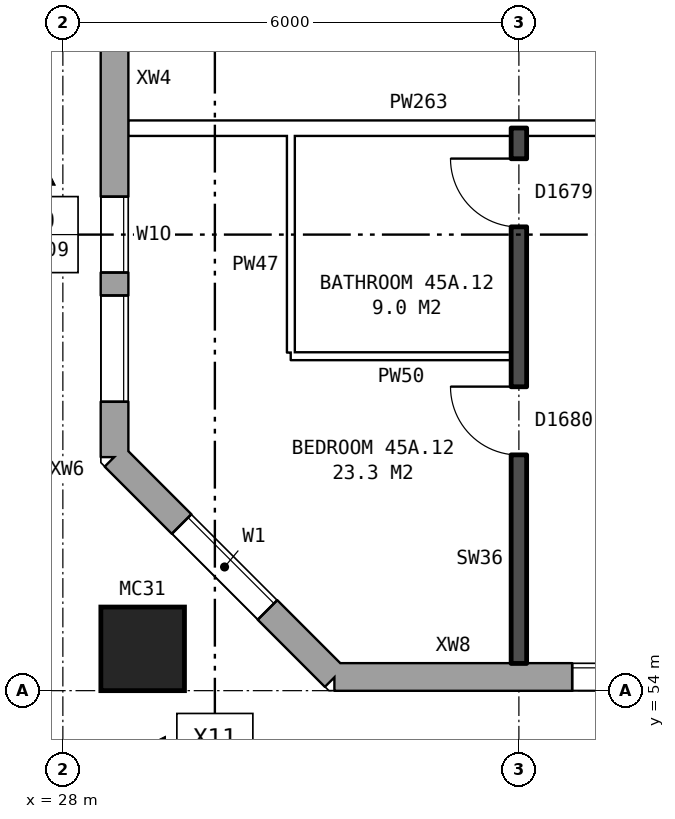
"""IFC4 building model, lengths in metres.
Left out: names, types, materials, properties, quantities, classifications, styles, units other than length and angle.
Written with IfcOpenShell. Run it as: python <this file> out.ifc"""

import sys

from ifc_helpers import new_model, si_unit, direction, frame, frame_2d, origin, origin_2d, place, context, subcontext, project, spatial, rectangle, hollow_rectangle, extrude, element, fill, save


model = new_model("IFC4")
c1 = context("Model", 3, precision=1e-05, world=origin(), true_north=direction((0.0, 1.0)))
c2 = subcontext(c1, "Body", "Model", "MODEL_VIEW")
j1 = project(units=[si_unit("LENGTHUNIT", "METRE"), si_unit("PLANEANGLEUNIT", "RADIAN")], contexts=[c1])
p1 = place(None, origin())
s1 = spatial("IfcSite", under=j1, at=p1, CompositionType="ELEMENT")
p2 = place(p1, origin())
s2 = spatial("IfcBuilding", under=s1, at=p2, CompositionType="ELEMENT")
p3 = place(p2, frame((0.0, 0.0, 160.9)))
s3 = spatial("IfcBuildingStorey", under=s2, at=p3, CompositionType="ELEMENT", Elevation=160.9)
p4 = place(p3, frame((29.05, 54.55, 0.0), z_axis=(0.0, 0.0, 1.0), x_axis=(1.0, 0.0, 0.0)))
e1 = element("IfcColumn", 1, at=p4, inside=s3, PredefinedType="COLUMN", context=c2, shape_type="SweptSolid", body=[
    extrude(hollow_rectangle(XDim=1.1, YDim=1.1, WallThickness=0.06, at=origin_2d()), origin(), (0.0, 0.0, 1.0), 3.1),
])
p5 = place(p3, frame((28.68, 57.075, 0.0), z_axis=(0.0, 0.0, 1.0), x_axis=(0.707106781187, -0.707106781187, 0.0)))
e2 = element("IfcWall", 2, at=p5, inside=s3, PredefinedType="STANDARD", context=c2, shape_type="SweptSolid", body=[
    extrude(rectangle(XDim=4.094, YDim=0.36, at=frame_2d((2.047, 0.0))), origin(), (0.0, 0.0, 1.0), 2.85),
])
p6 = place(p5, frame((1.247, 0.0, 0.8)))
e3 = element("IfcOpeningElement", 3, at=p6, cuts=e2, PredefinedType="OPENING", context=c2, shape_type="SweptSolid", body=[
    extrude(rectangle(XDim=1.6, YDim=1.8, at=frame_2d((0.8, 0.9))), frame((0.0, 0.19, 0.0), z_axis=(0.0, -1.0, 0.0), x_axis=(1.0, 0.0, 0.0)), (0.0, 0.0, 1.0), 0.38),
])
p7 = place(p3, frame((31.575, 54.18, 0.0), z_axis=(0.0, 0.0, 1.0), x_axis=(1.0, 0.0, 0.0)))
e4 = element("IfcWall", 4, at=p7, inside=s3, PredefinedType="STANDARD", context=c2, shape_type="SweptSolid", body=[
    extrude(rectangle(XDim=41.351, YDim=0.36, at=frame_2d((20.675, 0.0))), origin(), (0.0, 0.0, 1.0), 2.85),
])
p8 = place(p7, frame((3.125, 0.0, 0.8)))
e5 = element("IfcOpeningElement", 5, at=p8, cuts=e4, PredefinedType="OPENING", context=c2, shape_type="SweptSolid", body=[
    extrude(rectangle(XDim=1.6, YDim=1.8, at=frame_2d((0.8, 0.9))), frame((0.0, 0.19, 0.0), z_axis=(0.0, -1.0, 0.0), x_axis=(1.0, 0.0, 0.0)), (0.0, 0.0, 1.0), 0.38),
])
p9 = place(p7, frame((6.125, 0.0, 0.8)))
e6 = element("IfcOpeningElement", 6, at=p9, cuts=e4, PredefinedType="OPENING", context=c2, shape_type="SweptSolid", body=[
    extrude(rectangle(XDim=1.6, YDim=1.8, at=frame_2d((0.8, 0.9))), frame((0.0, 0.19, 0.0), z_axis=(0.0, -1.0, 0.0), x_axis=(1.0, 0.0, 0.0)), (0.0, 0.0, 1.0), 0.38),
])
p10 = place(p7, frame((9.125, 0.0, 0.8)))
e7 = element("IfcOpeningElement", 7, at=p10, cuts=e4, PredefinedType="OPENING", context=c2, shape_type="SweptSolid", body=[
    extrude(rectangle(XDim=1.6, YDim=1.8, at=frame_2d((0.8, 0.9))), frame((0.0, 0.19, 0.0), z_axis=(0.0, -1.0, 0.0), x_axis=(1.0, 0.0, 0.0)), (0.0, 0.0, 1.0), 0.38),
])
p11 = place(p7, frame((12.125, 0.0, 0.8)))
e8 = element("IfcOpeningElement", 8, at=p11, cuts=e4, PredefinedType="OPENING", context=c2, shape_type="SweptSolid", body=[
    extrude(rectangle(XDim=1.6, YDim=1.8, at=frame_2d((0.8, 0.9))), frame((0.0, 0.19, 0.0), z_axis=(0.0, -1.0, 0.0), x_axis=(1.0, 0.0, 0.0)), (0.0, 0.0, 1.0), 0.38),
])
p12 = place(p7, frame((15.375, 0.0, 0.25)))
e9 = element("IfcOpeningElement", 9, at=p12, cuts=e4, PredefinedType="OPENING", context=c2, shape_type="SweptSolid", body=[
    extrude(rectangle(XDim=0.6, YDim=0.9, at=frame_2d((0.3, 0.45))), frame((0.0, 0.19, 0.0), z_axis=(0.0, -1.0, 0.0), x_axis=(1.0, 0.0, 0.0)), (0.0, 0.0, 1.0), 0.38),
])
p13 = place(p7, frame((18.125, 0.0, 0.8)))
e10 = element("IfcOpeningElement", 10, at=p13, cuts=e4, PredefinedType="OPENING", context=c2, shape_type="SweptSolid", body=[
    extrude(rectangle(XDim=1.6, YDim=1.8, at=frame_2d((0.8, 0.9))), frame((0.0, 0.19, 0.0), z_axis=(0.0, -1.0, 0.0), x_axis=(1.0, 0.0, 0.0)), (0.0, 0.0, 1.0), 0.38),
])
p14 = place(p7, frame((21.125, 0.0, 0.8)))
e11 = element("IfcOpeningElement", 11, at=p14, cuts=e4, PredefinedType="OPENING", context=c2, shape_type="SweptSolid", body=[
    extrude(rectangle(XDim=1.6, YDim=1.8, at=frame_2d((0.8, 0.9))), frame((0.0, 0.19, 0.0), z_axis=(0.0, -1.0, 0.0), x_axis=(1.0, 0.0, 0.0)), (0.0, 0.0, 1.0), 0.38),
])
p15 = place(p7, frame((23.575, 0.0, 0.25)))
e12 = element("IfcOpeningElement", 12, at=p15, cuts=e4, PredefinedType="OPENING", context=c2, shape_type="SweptSolid", body=[
    extrude(rectangle(XDim=1.2, YDim=1.8, at=frame_2d((0.6, 0.9))), frame((0.0, 0.19, 0.0), z_axis=(0.0, -1.0, 0.0), x_axis=(1.0, 0.0, 0.0)), (0.0, 0.0, 1.0), 0.38),
])
p16 = place(p7, frame((26.625, 0.0, 1.7)))
e13 = element("IfcOpeningElement", 13, at=p16, cuts=e4, PredefinedType="OPENING", context=c2, shape_type="SweptSolid", body=[
    extrude(rectangle(XDim=0.6, YDim=0.9, at=frame_2d((0.3, 0.45))), frame((0.0, 0.19, 0.0), z_axis=(0.0, -1.0, 0.0), x_axis=(1.0, 0.0, 0.0)), (0.0, 0.0, 1.0), 0.38),
])
p17 = place(p7, frame((30.125, 0.0, 0.8)))
e14 = element("IfcOpeningElement", 14, at=p17, cuts=e4, PredefinedType="OPENING", context=c2, shape_type="SweptSolid", body=[
    extrude(rectangle(XDim=1.6, YDim=1.8, at=frame_2d((0.8, 0.9))), frame((0.0, 0.19, 0.0), z_axis=(0.0, -1.0, 0.0), x_axis=(1.0, 0.0, 0.0)), (0.0, 0.0, 1.0), 0.38),
])
p18 = place(p7, frame((33.125, 0.0, 0.8)))
e15 = element("IfcOpeningElement", 15, at=p18, cuts=e4, PredefinedType="OPENING", context=c2, shape_type="SweptSolid", body=[
    extrude(rectangle(XDim=1.6, YDim=1.8, at=frame_2d((0.8, 0.9))), frame((0.0, 0.19, 0.0), z_axis=(0.0, -1.0, 0.0), x_axis=(1.0, 0.0, 0.0)), (0.0, 0.0, 1.0), 0.38),
])
p19 = place(p7, frame((36.125, 0.0, 0.8)))
e16 = element("IfcOpeningElement", 16, at=p19, cuts=e4, PredefinedType="OPENING", context=c2, shape_type="SweptSolid", body=[
    extrude(rectangle(XDim=1.6, YDim=1.8, at=frame_2d((0.8, 0.9))), frame((0.0, 0.19, 0.0), z_axis=(0.0, -1.0, 0.0), x_axis=(1.0, 0.0, 0.0)), (0.0, 0.0, 1.0), 0.38),
])
p20 = place(p7, frame((39.125, 0.0, 0.8)))
e17 = element("IfcOpeningElement", 17, at=p20, cuts=e4, PredefinedType="OPENING", context=c2, shape_type="SweptSolid", body=[
    extrude(rectangle(XDim=1.6, YDim=1.8, at=frame_2d((0.8, 0.9))), frame((0.0, 0.19, 0.0), z_axis=(0.0, -1.0, 0.0), x_axis=(1.0, 0.0, 0.0)), (0.0, 0.0, 1.0), 0.38),
])
p21 = place(p7, frame((16.275, 0.0, 0.35)))
e18 = element("IfcOpeningElement", 18, at=p21, cuts=e4, PredefinedType="OPENING", context=c2, shape_type="SweptSolid", body=[
    extrude(rectangle(XDim=1.0, YDim=1.5, at=frame_2d((0.5, 0.75))), frame((0.0, 0.19, 0.0), z_axis=(0.0, -1.0, 0.0), x_axis=(1.0, 0.0, 0.0)), (0.0, 0.0, 1.0), 0.38),
])
p22 = place(p7, frame((25.075, 0.0, 0.25)))
e19 = element("IfcOpeningElement", 19, at=p22, cuts=e4, PredefinedType="OPENING", context=c2, shape_type="SweptSolid", body=[
    extrude(rectangle(XDim=0.8, YDim=0.9, at=frame_2d((0.4, 0.45))), frame((0.0, 0.19, 0.0), z_axis=(0.0, -1.0, 0.0), x_axis=(1.0, 0.0, 0.0)), (0.0, 0.0, 1.0), 0.38),
])
p23 = place(p7, frame((27.675, 0.0, 0.8)))
e20 = element("IfcOpeningElement", 20, at=p23, cuts=e4, PredefinedType="OPENING", context=c2, shape_type="SweptSolid", body=[
    extrude(rectangle(XDim=1.6, YDim=1.8, at=frame_2d((0.8, 0.9))), frame((0.0, 0.19, 0.0), z_axis=(0.0, -1.0, 0.0), x_axis=(1.0, 0.0, 0.0)), (0.0, 0.0, 1.0), 0.38),
])
p24 = place(p3, frame((28.68, 82.925, 0.0), z_axis=(0.0, 0.0, 1.0), x_axis=(0.0, -1.0, 0.0)))
e21 = element("IfcWall", 21, at=p24, inside=s3, PredefinedType="STANDARD", context=c2, shape_type="SweptSolid", body=[
    extrude(rectangle(XDim=25.851, YDim=0.36, at=frame_2d((12.925, 0.0))), origin(), (0.0, 0.0, 1.0), 2.85),
])
p25 = place(p24, frame((0.3, 0.0, 0.8)))
e22 = element("IfcOpeningElement", 22, at=p25, cuts=e21, PredefinedType="OPENING", context=c2, shape_type="SweptSolid", body=[
    extrude(rectangle(XDim=1.4, YDim=1.8, at=frame_2d((0.7, 0.9))), frame((0.0, 0.19, 0.0), z_axis=(0.0, -1.0, 0.0), x_axis=(1.0, 0.0, 0.0)), (0.0, 0.0, 1.0), 0.38),
])
p26 = place(p24, frame((5.475, 0.0, 1.4)))
e23 = element("IfcOpeningElement", 23, at=p26, cuts=e21, PredefinedType="OPENING", context=c2, shape_type="SweptSolid", body=[
    extrude(rectangle(XDim=1.4, YDim=1.2, at=frame_2d((0.7, 0.6))), frame((0.0, 0.19, 0.0), z_axis=(0.0, -1.0, 0.0), x_axis=(1.0, 0.0, 0.0)), (0.0, 0.0, 1.0), 0.38),
])
p27 = place(p24, frame((7.625, 0.0, 0.8)))
e24 = element("IfcOpeningElement", 24, at=p27, cuts=e21, PredefinedType="OPENING", context=c2, shape_type="SweptSolid", body=[
    extrude(rectangle(XDim=1.6, YDim=1.8, at=frame_2d((0.8, 0.9))), frame((0.0, 0.19, 0.0), z_axis=(0.0, -1.0, 0.0), x_axis=(1.0, 0.0, 0.0)), (0.0, 0.0, 1.0), 0.38),
])
p28 = place(p24, frame((10.625, 0.0, 0.8)))
e25 = element("IfcOpeningElement", 25, at=p28, cuts=e21, PredefinedType="OPENING", context=c2, shape_type="SweptSolid", body=[
    extrude(rectangle(XDim=1.6, YDim=1.8, at=frame_2d((0.8, 0.9))), frame((0.0, 0.19, 0.0), z_axis=(0.0, -1.0, 0.0), x_axis=(1.0, 0.0, 0.0)), (0.0, 0.0, 1.0), 0.38),
])
p29 = place(p24, frame((13.625, 0.0, 0.8)))
e26 = element("IfcOpeningElement", 26, at=p29, cuts=e21, PredefinedType="OPENING", context=c2, shape_type="SweptSolid", body=[
    extrude(rectangle(XDim=1.6, YDim=1.8, at=frame_2d((0.8, 0.9))), frame((0.0, 0.19, 0.0), z_axis=(0.0, -1.0, 0.0), x_axis=(1.0, 0.0, 0.0)), (0.0, 0.0, 1.0), 0.38),
])
p30 = place(p24, frame((16.625, 0.0, 0.8)))
e27 = element("IfcOpeningElement", 27, at=p30, cuts=e21, PredefinedType="OPENING", context=c2, shape_type="SweptSolid", body=[
    extrude(rectangle(XDim=1.6, YDim=1.8, at=frame_2d((0.8, 0.9))), frame((0.0, 0.19, 0.0), z_axis=(0.0, -1.0, 0.0), x_axis=(1.0, 0.0, 0.0)), (0.0, 0.0, 1.0), 0.38),
])
p31 = place(p24, frame((9.525, 0.0, 0.8)))
e28 = element("IfcOpeningElement", 28, at=p31, cuts=e21, PredefinedType="OPENING", context=c2, shape_type="SweptSolid", body=[
    extrude(rectangle(XDim=0.8, YDim=1.8, at=frame_2d((0.4, 0.9))), frame((0.0, 0.19, 0.0), z_axis=(0.0, -1.0, 0.0), x_axis=(1.0, 0.0, 0.0)), (0.0, 0.0, 1.0), 0.38),
])
p32 = place(p24, frame((22.425, 0.0, 0.8)))
e29 = element("IfcOpeningElement", 29, at=p32, cuts=e21, PredefinedType="OPENING", context=c2, shape_type="SweptSolid", body=[
    extrude(rectangle(XDim=1.0, YDim=1.2, at=frame_2d((0.5, 0.6))), frame((0.0, 0.19, 0.0), z_axis=(0.0, -1.0, 0.0), x_axis=(1.0, 0.0, 0.0)), (0.0, 0.0, 1.0), 0.38),
])
p33 = place(p24, frame((2.0, 0.0, 0.8)))
e30 = element("IfcOpeningElement", 30, at=p33, cuts=e21, PredefinedType="OPENING", context=c2, shape_type="SweptSolid", body=[
    extrude(rectangle(XDim=0.8, YDim=1.5, at=frame_2d((0.4, 0.75))), frame((0.0, 0.19, 0.0), z_axis=(0.0, -1.0, 0.0), x_axis=(1.0, 0.0, 0.0)), (0.0, 0.0, 1.0), 0.38),
])
p34 = place(p24, frame((12.525, 0.0, 0.8)))
e31 = element("IfcOpeningElement", 31, at=p34, cuts=e21, PredefinedType="OPENING", context=c2, shape_type="SweptSolid", body=[
    extrude(rectangle(XDim=0.8, YDim=1.8, at=frame_2d((0.4, 0.9))), frame((0.0, 0.19, 0.0), z_axis=(0.0, -1.0, 0.0), x_axis=(1.0, 0.0, 0.0)), (0.0, 0.0, 1.0), 0.38),
])
p35 = place(p24, frame((15.525, 0.0, 0.8)))
e32 = element("IfcOpeningElement", 32, at=p35, cuts=e21, PredefinedType="OPENING", context=c2, shape_type="SweptSolid", body=[
    extrude(rectangle(XDim=0.8, YDim=1.8, at=frame_2d((0.4, 0.9))), frame((0.0, 0.19, 0.0), z_axis=(0.0, -1.0, 0.0), x_axis=(1.0, 0.0, 0.0)), (0.0, 0.0, 1.0), 0.38),
])
p36 = place(p24, frame((18.525, 0.0, 0.8)))
e33 = element("IfcOpeningElement", 33, at=p36, cuts=e21, PredefinedType="OPENING", context=c2, shape_type="SweptSolid", body=[
    extrude(rectangle(XDim=0.8, YDim=1.8, at=frame_2d((0.4, 0.9))), frame((0.0, 0.19, 0.0), z_axis=(0.0, -1.0, 0.0), x_axis=(1.0, 0.0, 0.0)), (0.0, 0.0, 1.0), 0.38),
])
p37 = place(p24, frame((23.725, 0.0, 0.8)))
e34 = element("IfcOpeningElement", 34, at=p37, cuts=e21, PredefinedType="OPENING", context=c2, shape_type="SweptSolid", body=[
    extrude(rectangle(XDim=1.4, YDim=1.8, at=frame_2d((0.7, 0.9))), frame((0.0, 0.19, 0.0), z_axis=(0.0, -1.0, 0.0), x_axis=(1.0, 0.0, 0.0)), (0.0, 0.0, 1.0), 0.38),
])
p38 = place(p3, frame((31.0, 58.4, 0.0), z_axis=(0.0, 0.0, 1.0), x_axis=(1.0, 0.0, 0.0)))
e35 = element("IfcWall", 35, at=p38, inside=s3, PredefinedType="PARTITIONING", context=c2, shape_type="SweptSolid", body=[
    extrude(rectangle(XDim=2.9, YDim=0.1, at=frame_2d((1.45, 0.0))), origin(), (0.0, 0.0, 1.0), 2.85),
])
p39 = place(p3, frame((28.86, 61.4, 0.0), z_axis=(0.0, 0.0, 1.0), x_axis=(1.0, 0.0, 0.0)))
e36 = element("IfcWall", 36, at=p39, inside=s3, PredefinedType="PARTITIONING", context=c2, shape_type="SweptSolid", body=[
    extrude(rectangle(XDim=17.04, YDim=0.2, at=frame_2d((8.52, 0.0))), origin(), (0.0, 0.0, 1.0), 2.85),
])
p40 = place(p39, frame((14.59, 0.0, 0.0)))
e37 = element("IfcOpeningElement", 37, at=p40, cuts=e36, PredefinedType="OPENING", context=c2, shape_type="SweptSolid", body=[
    extrude(rectangle(XDim=1.0, YDim=2.1, at=frame_2d((0.5, 1.05))), frame((0.0, 0.11, 0.0), z_axis=(0.0, -1.0, 0.0), x_axis=(1.0, 0.0, 0.0)), (0.0, 0.0, 1.0), 0.22),
])
p41 = place(p39, frame((7.64, 0.0, 0.0)))
e38 = element("IfcOpeningElement", 38, at=p41, cuts=e36, PredefinedType="OPENING", context=c2, shape_type="SweptSolid", body=[
    extrude(rectangle(XDim=1.0, YDim=2.1, at=frame_2d((0.5, 1.05))), frame((0.0, 0.11, 0.0), z_axis=(0.0, -1.0, 0.0), x_axis=(1.0, 0.0, 0.0)), (0.0, 0.0, 1.0), 0.22),
])
p42 = place(p3, frame((31.0, 58.45, 0.0), z_axis=(0.0, 0.0, 1.0), x_axis=(0.0, 1.0, 0.0)))
e39 = element("IfcWall", 39, at=p42, inside=s3, PredefinedType="PARTITIONING", context=c2, shape_type="SweptSolid", body=[
    extrude(rectangle(XDim=2.85, YDim=0.1, at=frame_2d((1.425, 0.0))), origin(), (0.0, 0.0, 1.0), 2.85),
])
p43 = place(p3, frame((34.0, 54.36, 0.0), z_axis=(0.0, 0.0, 1.0), x_axis=(0.0, 1.0, 0.0)))
e40 = element("IfcWall", 40, at=p43, inside=s3, PredefinedType="SOLIDWALL", context=c2, shape_type="SweptSolid", body=[
    extrude(rectangle(XDim=7.04, YDim=0.2, at=frame_2d((3.52, 0.0))), origin(), (0.0, 0.0, 1.0), 2.85),
])
p44 = place(p43, frame((2.74, 0.0, 0.0)))
e41 = element("IfcOpeningElement", 41, at=p44, cuts=e40, PredefinedType="OPENING", context=c2, shape_type="SweptSolid", body=[
    extrude(rectangle(XDim=0.9, YDim=2.1, at=frame_2d((0.45, 1.05))), frame((0.0, 0.11, 0.0), z_axis=(0.0, -1.0, 0.0), x_axis=(1.0, 0.0, 0.0)), (0.0, 0.0, 1.0), 0.22),
])
p45 = place(p43, frame((5.74, 0.0, 0.0)))
e42 = element("IfcOpeningElement", 42, at=p45, cuts=e40, PredefinedType="OPENING", context=c2, shape_type="SweptSolid", body=[
    extrude(rectangle(XDim=0.9, YDim=2.1, at=frame_2d((0.45, 1.05))), frame((0.0, 0.11, 0.0), z_axis=(0.0, -1.0, 0.0), x_axis=(1.0, 0.0, 0.0)), (0.0, 0.0, 1.0), 0.22),
])
p46 = place(p6, origin())
e43 = element("IfcWindow", 43, at=p46, inside=s3, PartitioningType="SINGLE_PANEL", PredefinedType="WINDOW", context=c2, shape_type="SweptSolid", body=[
    extrude(rectangle(XDim=1.6, YDim=1.8, at=frame_2d((0.8, 0.9))), frame((0.0, 0.15, 0.0), z_axis=(0.0, -1.0, 0.0), x_axis=(1.0, 0.0, 0.0)), (0.0, 0.0, 1.0), 0.06),
])
fill(e3, e43)
p47 = place(p8, origin())
e44 = element("IfcWindow", 44, at=p47, inside=s3, PartitioningType="SINGLE_PANEL", PredefinedType="WINDOW", context=c2, shape_type="SweptSolid", body=[
    extrude(rectangle(XDim=1.6, YDim=1.8, at=frame_2d((0.8, 0.9))), frame((0.0, 0.15, 0.0), z_axis=(0.0, -1.0, 0.0), x_axis=(1.0, 0.0, 0.0)), (0.0, 0.0, 1.0), 0.06),
])
fill(e5, e44)
p48 = place(p32, origin())
e45 = element("IfcWindow", 45, at=p48, inside=s3, PartitioningType="SINGLE_PANEL", PredefinedType="WINDOW", context=c2, shape_type="SweptSolid", body=[
    extrude(rectangle(XDim=1.0, YDim=1.2, at=frame_2d((0.5, 0.6))), frame((0.0, 0.15, 0.0), z_axis=(0.0, -1.0, 0.0), x_axis=(1.0, 0.0, 0.0)), (0.0, 0.0, 1.0), 0.06),
])
fill(e29, e45)
p49 = place(p44, origin())
e46 = element("IfcDoor", 46, at=p49, inside=s3, OperationType="SINGLE_SWING_RIGHT", PredefinedType="DOOR", context=c2, shape_type="SweptSolid", body=[
    extrude(rectangle(XDim=0.9, YDim=2.1, at=frame_2d((0.45, 1.05))), frame((0.0, 0.025, 0.0), z_axis=(0.0, -1.0, 0.0), x_axis=(1.0, 0.0, 0.0)), (0.0, 0.0, 1.0), 0.05),
])
fill(e41, e46)
p50 = place(p45, origin())
e47 = element("IfcDoor", 47, at=p50, inside=s3, OperationType="SINGLE_SWING_RIGHT", PredefinedType="DOOR", context=c2, shape_type="SweptSolid", body=[
    extrude(rectangle(XDim=0.9, YDim=2.1, at=frame_2d((0.45, 1.05))), frame((0.0, 0.025, 0.0), z_axis=(0.0, -1.0, 0.0), x_axis=(1.0, 0.0, 0.0)), (0.0, 0.0, 1.0), 0.05),
])
fill(e42, e47)
p51 = place(p37, origin())
e48 = element("IfcWindow", 48, at=p51, inside=s3, PartitioningType="SINGLE_PANEL", PredefinedType="WINDOW", context=c2, shape_type="SweptSolid", body=[
    extrude(rectangle(XDim=1.4, YDim=1.8, at=frame_2d((0.7, 0.9))), frame((0.0, 0.15, 0.0), z_axis=(0.0, -1.0, 0.0), x_axis=(1.0, 0.0, 0.0)), (0.0, 0.0, 1.0), 0.06),
])
fill(e34, e48)
save(model, sys.argv[1])
